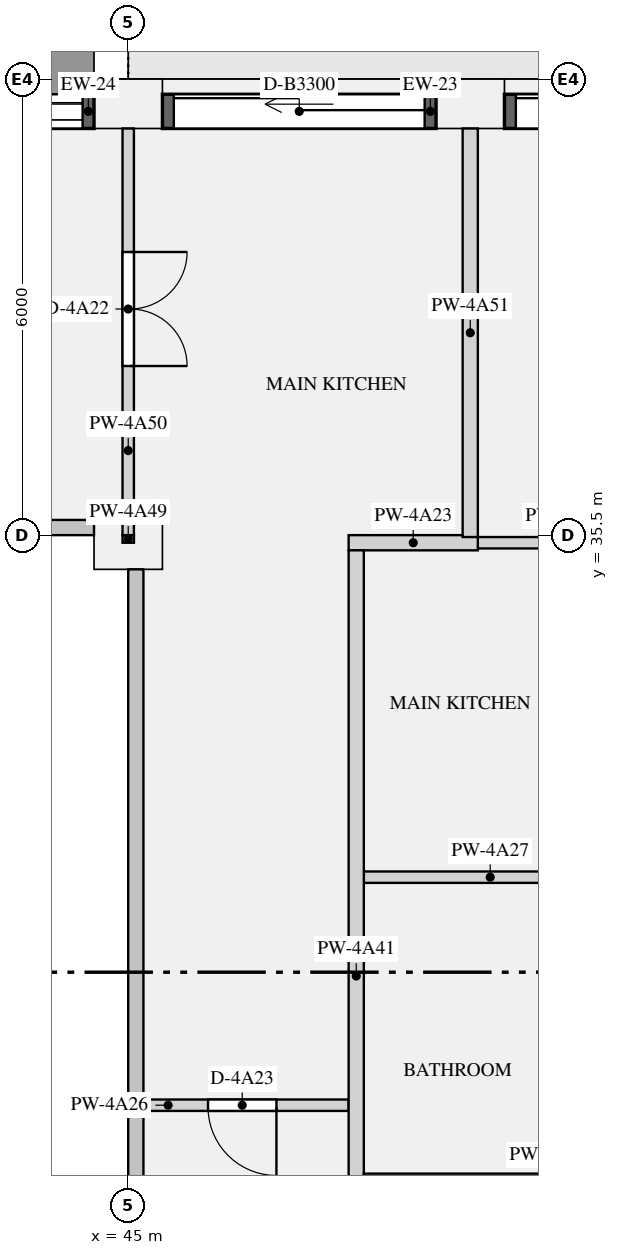
"""IFC4 building model, lengths in metres.
Left out: names, types, materials, properties, quantities, classifications, styles, units other than length and angle.
Written with IfcOpenShell. Run it as: python <this file> out.ifc"""

import sys

from ifc_helpers import new_model, si_unit, direction, frame, frame_2d, origin, origin_2d, place, context, subcontext, project, spatial, rectangle, extrude, element, fill, save


model = new_model("IFC4")
c1 = context("Model", 3, precision=1e-05, world=origin(), true_north=direction((0.0, 1.0)))
c2 = subcontext(c1, "Body", "Model", "MODEL_VIEW")
j1 = project(units=[si_unit("LENGTHUNIT", "METRE"), si_unit("PLANEANGLEUNIT", "RADIAN")], contexts=[c1])
p1 = place(None, origin())
s1 = spatial("IfcSite", under=j1, at=p1, CompositionType="ELEMENT")
p2 = place(p1, origin())
s2 = spatial("IfcBuilding", under=s1, at=p2, CompositionType="ELEMENT")
p3 = place(p2, frame((0.0, 0.0, 198.0)))
s3 = spatial("IfcBuildingStorey", under=s2, at=p3, CompositionType="ELEMENT", Elevation=198.0)
for number, where, z_axis, x_axis in (
    (1, (49.5, 41.175, 0.0), (0.0, 0.0, 1.0), (-1.0, 0.0, 0.0)),
    (2, (45.0, 41.175, 0.0), (0.0, 0.0, 1.0), (-1.0, 0.0, 0.0)),
):
    element("IfcColumn", number, at=place(p3, frame(where, z_axis=z_axis, x_axis=x_axis)), inside=s3, PredefinedType="USERDEFINED", context=c2, shape_type="SweptSolid", body=[
        extrude(rectangle(XDim=0.9, YDim=0.65, at=origin_2d()), origin(), (0.0, 0.0, 1.0), 3.15),
    ])
p4 = place(p3, frame((45.0, 35.5, 0.0), z_axis=(0.0, 0.0, 1.0), x_axis=(1.0, 0.0, 0.0)))
e3 = element("IfcColumn", 3, at=p4, inside=s3, PredefinedType="COLUMN", context=c2, shape_type="SweptSolid", body=[
    extrude(rectangle(XDim=0.9, YDim=0.9, at=origin_2d()), origin(), (0.0, 0.0, 1.0), 3.15),
])
p5 = place(p3, frame((53.55, 41.075, 0.0), z_axis=(0.0, 0.0, 1.0), x_axis=(-1.0, 0.0, 0.0)))
e4 = element("IfcWall", 4, at=p5, inside=s3, PredefinedType="SOLIDWALL", context=c2, shape_type="SweptSolid", body=[
    extrude(rectangle(XDim=3.6, YDim=0.45, at=frame_2d((1.8, 0.0))), origin(), (0.0, 0.0, 1.0), 2.83),
])
p6 = place(p5, frame((0.15, 0.0, 0.0)))
e5 = element("IfcOpeningElement", 5, at=p6, cuts=e4, PredefinedType="OPENING", context=c2, shape_type="SweptSolid", body=[
    extrude(rectangle(XDim=3.3, YDim=2.3, at=frame_2d((1.65, 1.15))), frame((0.0, 0.235, 0.0), z_axis=(0.0, -1.0, 0.0), x_axis=(1.0, 0.0, 0.0)), (0.0, 0.0, 1.0), 0.47),
])
p7 = place(p3, frame((49.05, 41.075, 0.0), z_axis=(0.0, 0.0, 1.0), x_axis=(-1.0, 0.0, 0.0)))
e6 = element("IfcWall", 6, at=p7, inside=s3, PredefinedType="SOLIDWALL", context=c2, shape_type="SweptSolid", body=[
    extrude(rectangle(XDim=3.6, YDim=0.45, at=frame_2d((1.8, 0.0))), origin(), (0.0, 0.0, 1.0), 2.83),
])
p8 = place(p7, frame((0.15, 0.0, 0.0)))
e7 = element("IfcOpeningElement", 7, at=p8, cuts=e6, PredefinedType="OPENING", context=c2, shape_type="SweptSolid", body=[
    extrude(rectangle(XDim=3.3, YDim=2.3, at=frame_2d((1.65, 1.15))), frame((0.0, 0.235, 0.0), z_axis=(0.0, -1.0, 0.0), x_axis=(1.0, 0.0, 0.0)), (0.0, 0.0, 1.0), 0.47),
])
p9 = place(p3, frame((44.55, 41.075, 0.9), z_axis=(0.0, 0.0, 1.0), x_axis=(-1.0, 0.0, 0.0)))
e8 = element("IfcWall", 8, at=p9, inside=s3, PredefinedType="SOLIDWALL", context=c2, shape_type="SweptSolid", body=[
    extrude(rectangle(XDim=3.6, YDim=0.45, at=frame_2d((1.8, 0.0))), origin(), (0.0, 0.0, 1.0), 1.93),
])
p10 = place(p9, frame((0.15, 0.0, 0.15)))
e9 = element("IfcOpeningElement", 9, at=p10, cuts=e8, PredefinedType="OPENING", context=c2, shape_type="SweptSolid", body=[
    extrude(rectangle(XDim=3.3, YDim=1.5, at=frame_2d((1.65, 0.75))), frame((0.0, 0.235, 0.0), z_axis=(0.0, -1.0, 0.0), x_axis=(1.0, 0.0, 0.0)), (0.0, 0.0, 1.0), 0.47),
])
p11 = place(p3, frame((48.1, 27.0, 0.0), z_axis=(0.0, 0.0, 1.0), x_axis=(1.0, 0.0, 0.0)))
e10 = element("IfcWall", 10, at=p11, inside=s3, PredefinedType="PARTITIONING", context=c2, shape_type="SweptSolid", body=[
    extrude(rectangle(XDim=6.8, YDim=0.2, at=frame_2d((3.4, 0.0))), origin(), (0.0, 0.0, 1.0), 2.83),
])
p12 = place(p11, frame((4.85, 0.0, 0.0)))
e11 = element("IfcOpeningElement", 11, at=p12, cuts=e10, PredefinedType="OPENING", context=c2, shape_type="SweptSolid", body=[
    extrude(rectangle(XDim=1.1, YDim=2.1, at=frame_2d((0.55, 1.05))), frame((0.0, 0.11, 0.0), z_axis=(0.0, -1.0, 0.0), x_axis=(1.0, 0.0, 0.0)), (0.0, 0.0, 1.0), 0.22),
])
p13 = place(p3, frame((49.4, 35.4, 0.0), z_axis=(0.0, 0.0, 1.0), x_axis=(1.0, 0.0, 0.0)))
e12 = element("IfcWall", 12, at=p13, inside=s3, PredefinedType="PARTITIONING", context=c2, shape_type="SweptSolid", body=[
    extrude(rectangle(XDim=6.8, YDim=0.15, at=frame_2d((3.4, 0.0))), origin(), (0.0, 0.0, 1.0), 2.83),
])
p14 = place(p13, frame((2.675, 0.0, 0.0)))
e13 = element("IfcOpeningElement", 13, at=p14, cuts=e12, PredefinedType="OPENING", context=c2, shape_type="SweptSolid", body=[
    extrude(rectangle(XDim=0.9, YDim=2.1, at=frame_2d((0.45, 1.05))), frame((0.0, 0.085, 0.0), z_axis=(0.0, -1.0, 0.0), x_axis=(1.0, 0.0, 0.0)), (0.0, 0.0, 1.0), 0.17),
])
p15 = place(p13, frame((5.475, 0.0, 0.0)))
e14 = element("IfcOpeningElement", 14, at=p15, cuts=e12, PredefinedType="OPENING", context=c2, shape_type="SweptSolid", body=[
    extrude(rectangle(XDim=0.9, YDim=2.1, at=frame_2d((0.45, 1.05))), frame((0.0, 0.085, 0.0), z_axis=(0.0, -1.0, 0.0), x_axis=(1.0, 0.0, 0.0)), (0.0, 0.0, 1.0), 0.17),
])
p16 = place(p3, frame((47.9, 35.4, 0.0), z_axis=(0.0, 0.0, 1.0), x_axis=(1.0, 0.0, 0.0)))
e15 = element("IfcWall", 15, at=p16, inside=s3, PredefinedType="PARTITIONING", context=c2, shape_type="SweptSolid", body=[
    extrude(rectangle(XDim=1.7, YDim=0.2, at=frame_2d((0.85, 0.0))), origin(), (0.0, 0.0, 1.0), 2.83),
])
p17 = place(p3, frame((45.0, 28.0, 0.0), z_axis=(0.0, 0.0, 1.0), x_axis=(1.0, 0.0, 0.0)))
e16 = element("IfcWall", 16, at=p17, inside=s3, PredefinedType="PARTITIONING", context=c2, shape_type="SweptSolid", body=[
    extrude(rectangle(XDim=2.9, YDim=0.15, at=frame_2d((1.45, 0.0))), origin(), (0.0, 0.0, 1.0), 2.83),
])
p18 = place(p17, frame((1.05, 0.0, 0.0)))
e17 = element("IfcOpeningElement", 17, at=p18, cuts=e16, PredefinedType="OPENING", context=c2, shape_type="SweptSolid", body=[
    extrude(rectangle(XDim=0.9, YDim=2.1, at=frame_2d((0.45, 1.05))), frame((0.0, 0.085, 0.0), z_axis=(0.0, -1.0, 0.0), x_axis=(1.0, 0.0, 0.0)), (0.0, 0.0, 1.0), 0.17),
])
p19 = place(p3, frame((48.1, 31.0, 0.0), z_axis=(0.0, 0.0, 1.0), x_axis=(1.0, 0.0, 0.0)))
e18 = element("IfcWall", 18, at=p19, inside=s3, PredefinedType="PARTITIONING", context=c2, shape_type="SweptSolid", body=[
    extrude(rectangle(XDim=3.325, YDim=0.15, at=frame_2d((1.663, 0.0))), origin(), (0.0, 0.0, 1.0), 2.83),
])
p20 = place(p3, frame((48.0, 24.1, 0.0), z_axis=(0.0, 0.0, 1.0), x_axis=(0.0, 1.0, 0.0)))
e19 = element("IfcWall", 19, at=p20, inside=s3, PredefinedType="PARTITIONING", context=c2, shape_type="SweptSolid", body=[
    extrude(rectangle(XDim=11.2, YDim=0.2, at=frame_2d((5.6, 0.0))), origin(), (0.0, 0.0, 1.0), 2.83),
])
p21 = place(p3, frame((45.0, 35.4, 0.0), z_axis=(0.0, 0.0, 1.0), x_axis=(0.0, 1.0, 0.0)))
e20 = element("IfcWall", 20, at=p21, inside=s3, PredefinedType="PARTITIONING", context=c2, shape_type="SweptSolid", body=[
    extrude(rectangle(XDim=0.1, YDim=0.15, at=frame_2d((0.05, 0.0))), origin(), (0.0, 0.0, 1.0), 2.83),
])
p22 = place(p3, frame((45.0, 35.5, 0.0), z_axis=(0.0, 0.0, 1.0), x_axis=(0.0, 1.0, 0.0)))
e21 = element("IfcWall", 21, at=p22, inside=s3, PredefinedType="PARTITIONING", context=c2, shape_type="SweptSolid", body=[
    extrude(rectangle(XDim=5.35, YDim=0.15, at=frame_2d((2.675, 0.0))), origin(), (0.0, 0.0, 1.0), 2.83),
])
p23 = place(p22, frame((2.225, 0.0, 0.0)))
e22 = element("IfcOpeningElement", 22, at=p23, cuts=e21, PredefinedType="OPENING", context=c2, shape_type="SweptSolid", body=[
    extrude(rectangle(XDim=1.5, YDim=2.1, at=frame_2d((0.75, 1.05))), frame((0.0, 0.085, 0.0), z_axis=(0.0, -1.0, 0.0), x_axis=(1.0, 0.0, 0.0)), (0.0, 0.0, 1.0), 0.17),
])
p24 = place(p3, frame((49.5, 35.475, 0.0), z_axis=(0.0, 0.0, 1.0), x_axis=(0.0, 1.0, 0.0)))
e23 = element("IfcWall", 23, at=p24, inside=s3, PredefinedType="PARTITIONING", context=c2, shape_type="SweptSolid", body=[
    extrude(rectangle(XDim=5.375, YDim=0.2, at=frame_2d((2.688, 0.0))), origin(), (0.0, 0.0, 1.0), 2.83),
])
p25 = place(p6, origin())
e24 = element("IfcDoor", 24, at=p25, inside=s3, OperationType="SLIDING_TO_LEFT", PredefinedType="DOOR", context=c2, shape_type="SweptSolid", body=[
    extrude(rectangle(XDim=3.3, YDim=2.3, at=frame_2d((1.65, 1.15))), frame((0.0, -0.07, 0.0), z_axis=(0.0, -1.0, 0.0), x_axis=(1.0, 0.0, 0.0)), (0.0, 0.0, 1.0), 0.05),
])
fill(e5, e24)
p26 = place(p8, origin())
e25 = element("IfcDoor", 25, at=p26, inside=s3, OperationType="SLIDING_TO_LEFT", PredefinedType="DOOR", context=c2, shape_type="SweptSolid", body=[
    extrude(rectangle(XDim=3.3, YDim=2.3, at=frame_2d((1.65, 1.15))), frame((0.0, -0.07, 0.0), z_axis=(0.0, -1.0, 0.0), x_axis=(1.0, 0.0, 0.0)), (0.0, 0.0, 1.0), 0.05),
])
fill(e7, e25)
p27 = place(p10, origin())
e26 = element("IfcWindow", 26, at=p27, inside=s3, PartitioningType="SINGLE_PANEL", PredefinedType="WINDOW", context=c2, shape_type="SweptSolid", body=[
    extrude(rectangle(XDim=3.3, YDim=1.5, at=frame_2d((1.65, 0.75))), frame((0.0, -0.065, 0.0), z_axis=(0.0, -1.0, 0.0), x_axis=(1.0, 0.0, 0.0)), (0.0, 0.0, 1.0), 0.06),
])
fill(e9, e26)
p28 = place(p23, frame((1.5, 0.0, 0.0), z_axis=(0.0, 0.0, 1.0), x_axis=(-1.0, 0.0, 0.0)))
e27 = element("IfcDoor", 27, at=p28, inside=s3, OperationType="DOUBLE_DOOR_SINGLE_SWING", PredefinedType="DOOR", context=c2, shape_type="SweptSolid", body=[
    extrude(rectangle(XDim=1.5, YDim=2.1, at=frame_2d((0.75, 1.05))), frame((0.0, 0.025, 0.0), z_axis=(0.0, -1.0, 0.0), x_axis=(1.0, 0.0, 0.0)), (0.0, 0.0, 1.0), 0.05),
])
fill(e22, e27)
p29 = place(p18, frame((0.9, 0.0, 0.0), z_axis=(0.0, 0.0, 1.0), x_axis=(-1.0, 0.0, 0.0)))
e28 = element("IfcDoor", 28, at=p29, inside=s3, OperationType="SINGLE_SWING_LEFT", PredefinedType="DOOR", context=c2, shape_type="SweptSolid", body=[
    extrude(rectangle(XDim=0.9, YDim=2.1, at=frame_2d((0.45, 1.05))), frame((0.0, 0.025, 0.0), z_axis=(0.0, -1.0, 0.0), x_axis=(1.0, 0.0, 0.0)), (0.0, 0.0, 1.0), 0.05),
])
fill(e17, e28)
save(model, sys.argv[1])
